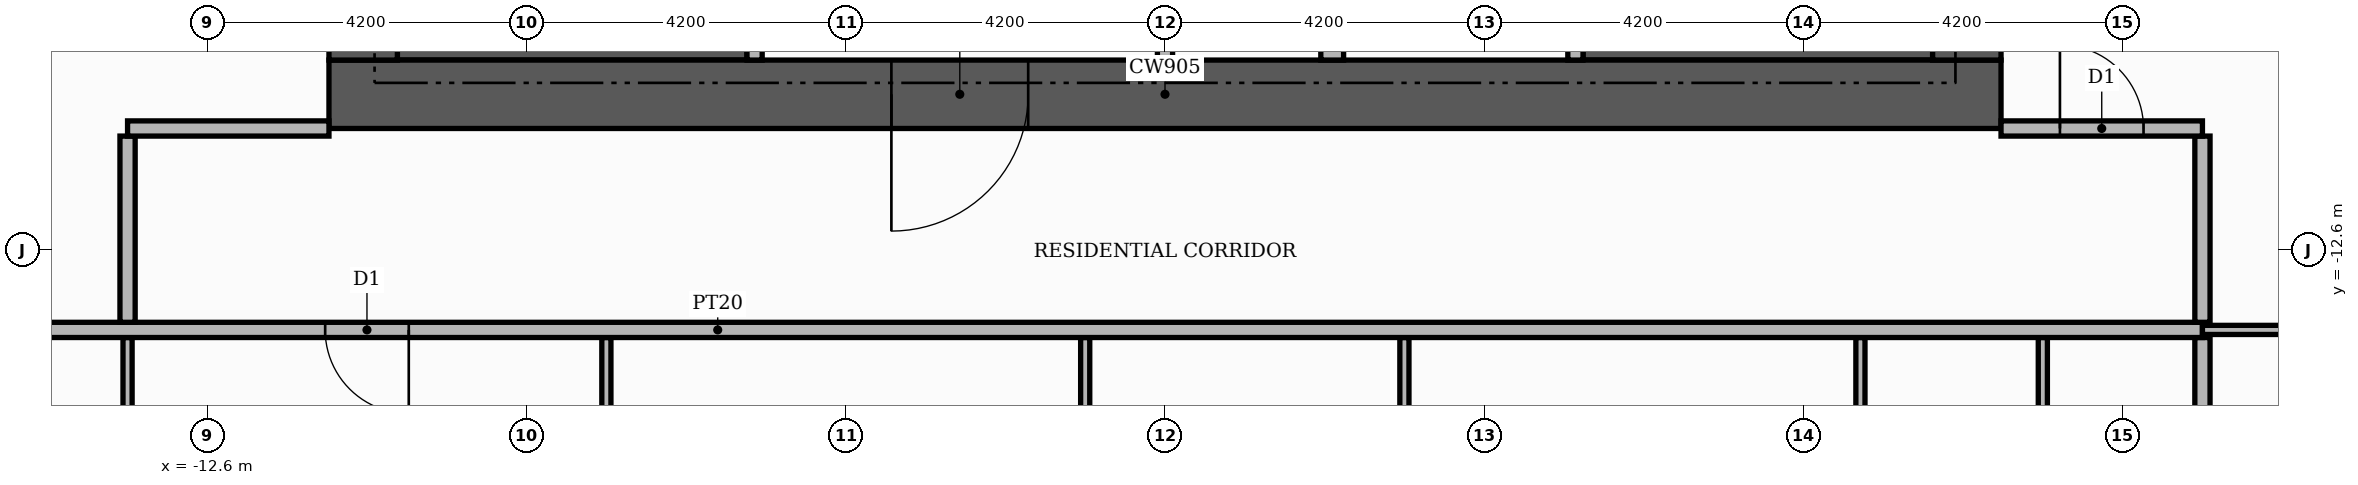
"""IFC4 building model, lengths in metres.
Left out: names, types, materials, properties, quantities, classifications, styles, units other than length and angle.
Written with IfcOpenShell. Run it as: python <this file> out.ifc"""

import sys

from ifc_helpers import new_model, si_unit, direction, frame, frame_2d, origin, place, context, subcontext, project, spatial, rectangle, extrude, element, fill, save


model = new_model("IFC4")
c1 = context("Model", 3, precision=1e-05, world=origin(), true_north=direction((0.0, 1.0)))
c2 = subcontext(c1, "Body", "Model", "MODEL_VIEW")
j1 = project(units=[si_unit("LENGTHUNIT", "METRE"), si_unit("PLANEANGLEUNIT", "RADIAN")], contexts=[c1])
p1 = place(None, origin())
s1 = spatial("IfcSite", under=j1, at=p1, CompositionType="ELEMENT")
p2 = place(p1, origin())
s2 = spatial("IfcBuilding", under=s1, at=p2, CompositionType="ELEMENT")
p3 = place(p2, frame((0.0, 0.0, 252.3)))
s3 = spatial("IfcBuildingStorey", under=s2, at=p3, CompositionType="ELEMENT", Elevation=252.3)
for number, where, z_axis, x_axis in (
    (1, (-10.1, -9.15, 0.0), (0.0, 0.0, 1.0), (1.0, 0.0, 0.0)),
    (2, (5.5, -9.15, 0.0), (0.0, 0.0, 1.0), (1.0, 0.0, 0.0)),
):
    element("IfcWall", number, at=place(p3, frame(where, z_axis=z_axis, x_axis=x_axis)), inside=s3, PredefinedType="SHEAR", context=c2, shape_type="SweptSolid", body=[
        extrude(rectangle(XDim=4.6, YDim=1.9, at=frame_2d((2.3, 0.0))), origin(), (0.0, 0.0, 1.0), 3.48),
    ])
p4 = place(p3, frame((-11.0, -10.55, 0.0), z_axis=(0.0, 0.0, 1.0), x_axis=(1.0, 0.0, 0.0)))
e3 = element("IfcWall", 3, at=p4, inside=s3, PredefinedType="SHEAR", context=c2, shape_type="SweptSolid", body=[
    extrude(rectangle(XDim=22.0, YDim=0.9, at=frame_2d((11.0, 0.0))), origin(), (0.0, 0.0, 1.0), 3.48),
])
p5 = place(p4, frame((7.4, 0.0, 0.0)))
e4 = element("IfcOpeningElement", 4, at=p5, cuts=e3, PredefinedType="OPENING", context=c2, shape_type="SweptSolid", body=[
    extrude(rectangle(XDim=1.8, YDim=2.2, at=frame_2d((0.9, 1.1))), frame((0.0, 0.46, 0.0), z_axis=(0.0, -1.0, 0.0), x_axis=(1.0, 0.0, 0.0)), (0.0, 0.0, 1.0), 0.92),
])
for number, where, z_axis, x_axis in (
    (5, (-10.55, -10.1, 0.0), (0.0, 0.0, 1.0), (0.0, 1.0, 0.0)),
    (6, (10.55, -10.1, 0.0), (0.0, 0.0, 1.0), (0.0, 1.0, 0.0)),
):
    element("IfcWall", number, at=place(p3, frame(where, z_axis=z_axis, x_axis=x_axis)), inside=s3, PredefinedType="SHEAR", context=c2, shape_type="SweptSolid", body=[
        extrude(rectangle(XDim=20.2, YDim=0.9, at=frame_2d((10.1, 0.0))), origin(), (0.0, 0.0, 1.0), 3.48),
    ])
p6 = place(p3, frame((-5.4, -10.1, 0.0), z_axis=(0.0, 0.0, 1.0), x_axis=(0.0, 1.0, 0.0)))
e7 = element("IfcWall", 7, at=p6, inside=s3, PredefinedType="PARTITIONING", context=c2, shape_type="SweptSolid", body=[
    extrude(rectangle(XDim=4.6, YDim=0.2, at=frame_2d((2.3, 0.0))), origin(), (0.0, 0.0, 1.0), 3.48),
])
p7 = place(p6, frame((2.9, 0.0, 0.0)))
e8 = element("IfcOpeningElement", 8, at=p7, cuts=e7, PredefinedType="OPENING", context=c2, shape_type="SweptSolid", body=[
    extrude(rectangle(XDim=1.0, YDim=2.1, at=frame_2d((0.5, 1.05))), frame((0.0, 0.11, 0.0), z_axis=(0.0, -1.0, 0.0), x_axis=(1.0, 0.0, 0.0)), (0.0, 0.0, 1.0), 0.22),
])
p8 = place(p3, frame((0.0, -10.1, 0.0), z_axis=(0.0, 0.0, 1.0), x_axis=(0.0, 1.0, 0.0)))
e9 = element("IfcWall", 9, at=p8, inside=s3, PredefinedType="PARTITIONING", context=c2, shape_type="SweptSolid", body=[
    extrude(rectangle(XDim=2.2, YDim=0.2, at=frame_2d((1.1, 0.0))), origin(), (0.0, 0.0, 1.0), 3.48),
])
p9 = place(p3, frame((2.2, -10.1, 0.0), z_axis=(0.0, 0.0, 1.0), x_axis=(0.0, 1.0, 0.0)))
e10 = element("IfcWall", 10, at=p9, inside=s3, PredefinedType="PARTITIONING", context=c2, shape_type="SweptSolid", body=[
    extrude(rectangle(XDim=2.2, YDim=0.3, at=frame_2d((1.1, 0.0))), origin(), (0.0, 0.0, 1.0), 3.48),
])
p10 = place(p3, frame((5.4, -10.1, 0.0), z_axis=(0.0, 0.0, 1.0), x_axis=(0.0, 1.0, 0.0)))
e11 = element("IfcWall", 11, at=p10, inside=s3, PredefinedType="PARTITIONING", context=c2, shape_type="SweptSolid", body=[
    extrude(rectangle(XDim=4.6, YDim=0.2, at=frame_2d((2.3, 0.0))), origin(), (0.0, 0.0, 1.0), 3.48),
])
p11 = place(p10, frame((2.9, 0.0, 0.0)))
e12 = element("IfcOpeningElement", 12, at=p11, cuts=e11, PredefinedType="OPENING", context=c2, shape_type="SweptSolid", body=[
    extrude(rectangle(XDim=1.0, YDim=2.1, at=frame_2d((0.5, 1.05))), frame((0.0, 0.11, 0.0), z_axis=(0.0, -1.0, 0.0), x_axis=(1.0, 0.0, 0.0)), (0.0, 0.0, 1.0), 0.22),
])
p12 = place(p3, frame((13.65, -25.42, 0.0), z_axis=(0.0, 0.0, 1.0), x_axis=(0.0, 1.0, 0.0)))
e13 = element("IfcWall", 13, at=p12, inside=s3, PredefinedType="PARTITIONING", context=c2, shape_type="SweptSolid", body=[
    extrude(rectangle(XDim=11.67, YDim=0.2, at=frame_2d((5.835, 0.0))), origin(), (0.0, 0.0, 1.0), 3.48),
])
p13 = place(p3, frame((-13.65, -20.66, 0.0), z_axis=(0.0, 0.0, 1.0), x_axis=(0.0, 1.0, 0.0)))
e14 = element("IfcWall", 14, at=p13, inside=s3, PredefinedType="PARTITIONING", context=c2, shape_type="SweptSolid", body=[
    extrude(rectangle(XDim=6.91, YDim=0.12, at=frame_2d((3.455, 0.0))), origin(), (0.0, 0.0, 1.0), 3.48),
])
p14 = place(p13, frame((3.025, 0.0, 0.0)))
e15 = element("IfcOpeningElement", 15, at=p14, cuts=e14, PredefinedType="OPENING", context=c2, shape_type="SweptSolid", body=[
    extrude(rectangle(XDim=0.9, YDim=2.1, at=frame_2d((0.45, 1.05))), frame((0.0, 0.07, 0.0), z_axis=(0.0, -1.0, 0.0), x_axis=(1.0, 0.0, 0.0)), (0.0, 0.0, 1.0), 0.14),
])
for number, where, z_axis, x_axis in (
    (16, (-7.35, -19.16, 0.0), (0.0, 0.0, 1.0), (0.0, 1.0, 0.0)),
    (17, (-1.05, -19.16, 0.0), (0.0, 0.0, 1.0), (0.0, 1.0, 0.0)),
    (18, (3.15, -19.16, 0.0), (0.0, 0.0, 1.0), (0.0, 1.0, 0.0)),
    (19, (9.15, -19.16, 0.0), (0.0, 0.0, 1.0), (0.0, 1.0, 0.0)),
    (20, (11.55, -19.16, 0.0), (0.0, 0.0, 1.0), (0.0, 1.0, 0.0)),
):
    element("IfcWall", number, at=place(p3, frame(where, z_axis=z_axis, x_axis=x_axis)), inside=s3, PredefinedType="PARTITIONING", context=c2, shape_type="SweptSolid", body=[
        extrude(rectangle(XDim=5.41, YDim=0.12, at=frame_2d((2.705, 0.0))), origin(), (0.0, 0.0, 1.0), 3.48),
    ])
p15 = place(p3, frame((-25.42, -13.65, 0.0), z_axis=(0.0, 0.0, 1.0), x_axis=(1.0, 0.0, 0.0)))
e21 = element("IfcWall", 21, at=p15, inside=s3, PredefinedType="PARTITIONING", context=c2, shape_type="SweptSolid", body=[
    extrude(rectangle(XDim=39.07, YDim=0.2, at=frame_2d((19.535, 0.0))), origin(), (0.0, 0.0, 1.0), 3.48),
])
p16 = place(p15, frame((14.37, 0.0, 0.0)))
e22 = element("IfcOpeningElement", 22, at=p16, cuts=e21, PredefinedType="OPENING", context=c2, shape_type="SweptSolid", body=[
    extrude(rectangle(XDim=1.1, YDim=2.4, at=frame_2d((0.55, 1.2))), frame((0.0, 0.11, 0.0), z_axis=(0.0, -1.0, 0.0), x_axis=(1.0, 0.0, 0.0)), (0.0, 0.0, 1.0), 0.22),
])
p17 = place(p3, frame((13.65, -13.65, 0.0), z_axis=(0.0, 0.0, 1.0), x_axis=(1.0, 0.0, 0.0)))
e23 = element("IfcWall", 23, at=p17, inside=s3, PredefinedType="PARTITIONING", context=c2, shape_type="SweptSolid", body=[
    extrude(rectangle(XDim=6.17, YDim=0.12, at=frame_2d((3.085, 0.0))), origin(), (0.0, 0.0, 1.0), 3.48),
])
p18 = place(p17, frame((2.635, 0.0, 0.0)))
e24 = element("IfcOpeningElement", 24, at=p18, cuts=e23, PredefinedType="OPENING", context=c2, shape_type="SweptSolid", body=[
    extrude(rectangle(XDim=0.9, YDim=2.1, at=frame_2d((0.45, 1.05))), frame((0.0, 0.07, 0.0), z_axis=(0.0, -1.0, 0.0), x_axis=(1.0, 0.0, 0.0)), (0.0, 0.0, 1.0), 0.14),
])
for number, where, z_axis, x_axis in (
    (25, (-13.65, -13.55, 0.0), (0.0, 0.0, 1.0), (0.0, 1.0, 0.0)),
    (26, (13.65, -13.55, 0.0), (0.0, 0.0, 1.0), (0.0, 1.0, 0.0)),
):
    element("IfcWall", number, at=place(p3, frame(where, z_axis=z_axis, x_axis=x_axis)), inside=s3, PredefinedType="PARTITIONING", context=c2, shape_type="SweptSolid", body=[
        extrude(rectangle(XDim=2.45, YDim=0.2, at=frame_2d((1.225, 0.0))), origin(), (0.0, 0.0, 1.0), 3.48),
    ])
p19 = place(p3, frame((-13.65, -11.0, 0.0), z_axis=(0.0, 0.0, 1.0), x_axis=(1.0, 0.0, 0.0)))
e27 = element("IfcWall", 27, at=p19, inside=s3, PredefinedType="PARTITIONING", context=c2, shape_type="SweptSolid", body=[
    extrude(rectangle(XDim=2.65, YDim=0.2, at=frame_2d((1.325, 0.0))), origin(), (0.0, 0.0, 1.0), 3.48),
])
p20 = place(p3, frame((11.0, -11.0, 0.0), z_axis=(0.0, 0.0, 1.0), x_axis=(1.0, 0.0, 0.0)))
e28 = element("IfcWall", 28, at=p20, inside=s3, PredefinedType="PARTITIONING", context=c2, shape_type="SweptSolid", body=[
    extrude(rectangle(XDim=2.65, YDim=0.2, at=frame_2d((1.325, 0.0))), origin(), (0.0, 0.0, 1.0), 3.48),
])
p21 = place(p20, frame((0.775, 0.0, 0.0)))
e29 = element("IfcOpeningElement", 29, at=p21, cuts=e28, PredefinedType="OPENING", context=c2, shape_type="SweptSolid", body=[
    extrude(rectangle(XDim=1.1, YDim=2.4, at=frame_2d((0.55, 1.2))), frame((0.0, 0.11, 0.0), z_axis=(0.0, -1.0, 0.0), x_axis=(1.0, 0.0, 0.0)), (0.0, 0.0, 1.0), 0.22),
])
p22 = place(p5, frame((1.8, 0.0, 0.0), z_axis=(0.0, 0.0, 1.0), x_axis=(-1.0, 0.0, 0.0)))
e30 = element("IfcDoor", 30, at=p22, inside=s3, OperationType="DOUBLE_DOOR_SINGLE_SWING", PredefinedType="DOOR", context=c2, shape_type="SweptSolid", body=[
    extrude(rectangle(XDim=1.8, YDim=2.2, at=frame_2d((0.9, 1.1))), frame((0.0, 0.025, 0.0), z_axis=(0.0, -1.0, 0.0), x_axis=(1.0, 0.0, 0.0)), (0.0, 0.0, 1.0), 0.05),
])
fill(e4, e30)
p23 = place(p16, frame((1.1, 0.0, 0.0), z_axis=(0.0, 0.0, 1.0), x_axis=(-1.0, 0.0, 0.0)))
e31 = element("IfcDoor", 31, at=p23, inside=s3, OperationType="SINGLE_SWING_RIGHT", PredefinedType="DOOR", context=c2, shape_type="SweptSolid", body=[
    extrude(rectangle(XDim=1.1, YDim=2.4, at=frame_2d((0.55, 1.2))), frame((0.0, 0.025, 0.0), z_axis=(0.0, -1.0, 0.0), x_axis=(1.0, 0.0, 0.0)), (0.0, 0.0, 1.0), 0.05),
])
fill(e22, e31)
p24 = place(p21, origin())
e32 = element("IfcDoor", 32, at=p24, inside=s3, OperationType="SINGLE_SWING_LEFT", PredefinedType="DOOR", context=c2, shape_type="SweptSolid", body=[
    extrude(rectangle(XDim=1.1, YDim=2.4, at=frame_2d((0.55, 1.2))), frame((0.0, 0.025, 0.0), z_axis=(0.0, -1.0, 0.0), x_axis=(1.0, 0.0, 0.0)), (0.0, 0.0, 1.0), 0.05),
])
fill(e29, e32)
save(model, sys.argv[1])
